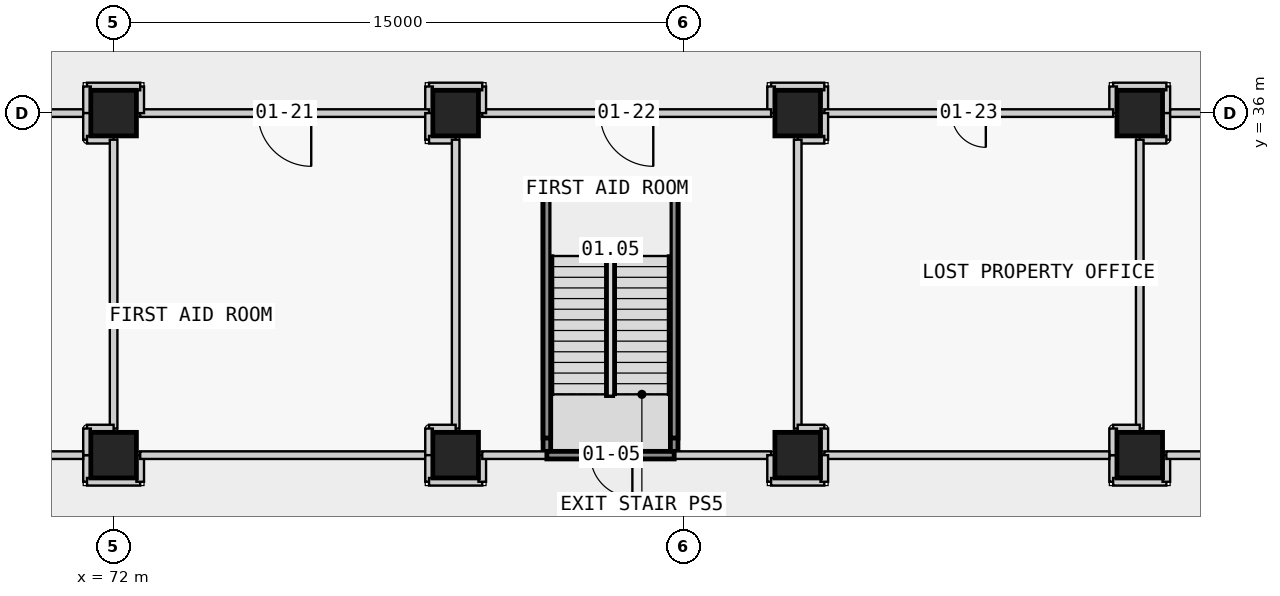
"""IFC4 building model, lengths in metres.
Left out: names, types, materials, properties, quantities, classifications, styles, units other than length and angle.
Written with IfcOpenShell. Run it as: python <this file> out.ifc"""

import sys

from ifc_helpers import new_model, si_unit, direction, frame, frame_2d, origin, origin_2d, place, context, subcontext, project, spatial, rectangle, extrude, element, fill, save


model = new_model("IFC4")
c1 = context("Model", 3, precision=1e-05, world=origin(), true_north=direction((0.0, 1.0)))
c2 = subcontext(c1, "Body", "Model", "MODEL_VIEW")
j1 = project(units=[si_unit("LENGTHUNIT", "METRE"), si_unit("PLANEANGLEUNIT", "RADIAN")], contexts=[c1])
p1 = place(None, origin())
s1 = spatial("IfcSite", under=j1, at=p1, CompositionType="ELEMENT")
p2 = place(p1, origin())
s2 = spatial("IfcBuilding", under=s1, at=p2, CompositionType="ELEMENT")
p3 = place(p2, frame((0.0, 0.0, 8.0)))
s3 = spatial("IfcBuildingStorey", under=s2, at=p3, CompositionType="ELEMENT", Elevation=8.0)
for number, where, z_axis, x_axis in (
    (1, (72.0, 27.0, 0.0), (0.0, 0.0, 1.0), (1.0, 0.0, 0.0)),
    (2, (72.0, 36.0, 0.0), (0.0, 0.0, 1.0), (1.0, 0.0, 0.0)),
    (3, (81.0, 27.0, 0.0), (0.0, 0.0, 1.0), (1.0, 0.0, 0.0)),
    (4, (81.0, 36.0, 0.0), (0.0, 0.0, 1.0), (1.0, 0.0, 0.0)),
    (5, (90.0, 27.0, 0.0), (0.0, 0.0, 1.0), (1.0, 0.0, 0.0)),
    (6, (90.0, 36.0, 0.0), (0.0, 0.0, 1.0), (1.0, 0.0, 0.0)),
    (7, (99.0, 27.0, 0.0), (0.0, 0.0, 1.0), (1.0, 0.0, 0.0)),
    (8, (99.0, 36.0, 0.0), (0.0, 0.0, 1.0), (1.0, 0.0, 0.0)),
):
    element("IfcColumn", number, at=place(p3, frame(where, z_axis=z_axis, x_axis=x_axis)), inside=s3, PredefinedType="COLUMN", context=c2, shape_type="SweptSolid", body=[
        extrude(rectangle(XDim=1.2, YDim=1.2, at=origin_2d()), origin(), (0.0, 0.0, 1.0), 4.8),
    ])
p4 = place(p3, frame((71.3, 36.0, 0.0), z_axis=(0.0, 0.0, 1.0), x_axis=(-1.0, 0.0, 0.0)))
e9 = element("IfcWall", 9, at=p4, inside=s3, PredefinedType="PARTITIONING", context=c2, shape_type="SweptSolid", body=[
    extrude(rectangle(XDim=7.6, YDim=0.2, at=frame_2d((3.8, 0.0))), origin(), (0.0, 0.0, 1.0), 3.75),
])
p5 = place(p4, frame((3.35, 0.0, 0.0)))
e10 = element("IfcOpeningElement", 10, at=p5, cuts=e9, PredefinedType="OPENING", context=c2, shape_type="SweptSolid", body=[
    extrude(rectangle(XDim=0.9, YDim=2.1, at=frame_2d((0.45, 1.05))), frame((0.0, 0.11, 0.0), z_axis=(0.0, -1.0, 0.0), x_axis=(1.0, 0.0, 0.0)), (0.0, 0.0, 1.0), 0.22),
])
p6 = place(p3, frame((83.4, 27.0, 0.0), z_axis=(0.0, 0.0, 1.0), x_axis=(0.0, 1.0, 0.0)))
e11 = element("IfcWall", 11, at=p6, inside=s3, PredefinedType="PARTITIONING", context=c2, shape_type="SweptSolid", body=[
    extrude(rectangle(XDim=6.9, YDim=0.2, at=frame_2d((3.45, 0.0))), origin(), (0.0, 0.0, 1.0), 3.75),
])
p7 = place(p3, frame((83.4, 33.9, 0.0), z_axis=(0.0, 0.0, 1.0), x_axis=(1.0, 0.0, 0.0)))
e12 = element("IfcWall", 12, at=p7, inside=s3, PredefinedType="PARTITIONING", context=c2, shape_type="SweptSolid", body=[
    extrude(rectangle(XDim=3.35, YDim=0.2, at=frame_2d((1.675, 0.0))), origin(), (0.0, 0.0, 1.0), 4.45),
])
p8 = place(p3, frame((86.75, 33.9, 0.0), z_axis=(0.0, 0.0, 1.0), x_axis=(0.0, -1.0, 0.0)))
e13 = element("IfcWall", 13, at=p8, inside=s3, PredefinedType="PARTITIONING", context=c2, shape_type="SweptSolid", body=[
    extrude(rectangle(XDim=6.9, YDim=0.2, at=frame_2d((3.45, 0.0))), origin(), (0.0, 0.0, 1.0), 3.75),
])
p9 = place(p3, frame((90.7, 36.0, 0.0), z_axis=(0.0, 0.0, 1.0), x_axis=(0.0, 1.0, 0.0)))
e14 = element("IfcWall", 14, at=p9, inside=s3, PredefinedType="PARTITIONING", context=c2, shape_type="SweptSolid", body=[
    extrude(rectangle(XDim=0.7, YDim=0.2, at=frame_2d((0.35, 0.0))), origin(), (0.0, 0.0, 1.0), 3.75),
])
p10 = place(p3, frame((90.7, 36.7, 0.0), z_axis=(0.0, 0.0, 1.0), x_axis=(-1.0, 0.0, 0.0)))
e15 = element("IfcWall", 15, at=p10, inside=s3, PredefinedType="PARTITIONING", context=c2, shape_type="SweptSolid", body=[
    extrude(rectangle(XDim=1.4, YDim=0.2, at=frame_2d((0.7, 0.0))), origin(), (0.0, 0.0, 1.0), 3.75),
])
p11 = place(p3, frame((89.3, 36.7, 0.0), z_axis=(0.0, 0.0, 1.0), x_axis=(0.0, -1.0, 0.0)))
e16 = element("IfcWall", 16, at=p11, inside=s3, PredefinedType="PARTITIONING", context=c2, shape_type="SweptSolid", body=[
    extrude(rectangle(XDim=0.7, YDim=0.2, at=frame_2d((0.35, 0.0))), origin(), (0.0, 0.0, 1.0), 3.75),
])
p12 = place(p3, frame((89.3, 36.0, 0.0), z_axis=(0.0, 0.0, 1.0), x_axis=(-1.0, 0.0, 0.0)))
e17 = element("IfcWall", 17, at=p12, inside=s3, PredefinedType="PARTITIONING", context=c2, shape_type="SweptSolid", body=[
    extrude(rectangle(XDim=7.6, YDim=0.2, at=frame_2d((3.8, 0.0))), origin(), (0.0, 0.0, 1.0), 3.75),
])
p13 = place(p12, frame((3.1, 0.0, 0.0)))
e18 = element("IfcOpeningElement", 18, at=p13, cuts=e17, PredefinedType="OPENING", context=c2, shape_type="SweptSolid", body=[
    extrude(rectangle(XDim=1.4, YDim=2.1, at=frame_2d((0.7, 1.05))), frame((0.0, 0.11, 0.0), z_axis=(0.0, -1.0, 0.0), x_axis=(1.0, 0.0, 0.0)), (0.0, 0.0, 1.0), 0.22),
])
p14 = place(p3, frame((81.7, 36.0, 0.0), z_axis=(0.0, 0.0, 1.0), x_axis=(0.0, 1.0, 0.0)))
e19 = element("IfcWall", 19, at=p14, inside=s3, PredefinedType="PARTITIONING", context=c2, shape_type="SweptSolid", body=[
    extrude(rectangle(XDim=0.7, YDim=0.2, at=frame_2d((0.35, 0.0))), origin(), (0.0, 0.0, 1.0), 3.75),
])
p15 = place(p3, frame((81.7, 36.7, 0.0), z_axis=(0.0, 0.0, 1.0), x_axis=(-1.0, 0.0, 0.0)))
e20 = element("IfcWall", 20, at=p15, inside=s3, PredefinedType="PARTITIONING", context=c2, shape_type="SweptSolid", body=[
    extrude(rectangle(XDim=1.4, YDim=0.2, at=frame_2d((0.7, 0.0))), origin(), (0.0, 0.0, 1.0), 3.75),
])
for number, where, z_axis, x_axis in (
    (21, (80.3, 36.7, 0.0), (0.0, 0.0, 1.0), (0.0, -1.0, 0.0)),
    (22, (98.3, 27.0, 0.0), (0.0, 0.0, 1.0), (0.0, -1.0, 0.0)),
):
    element("IfcWall", number, at=place(p3, frame(where, z_axis=z_axis, x_axis=x_axis)), inside=s3, PredefinedType="PARTITIONING", context=c2, shape_type="SweptSolid", body=[
        extrude(rectangle(XDim=0.7, YDim=0.2, at=frame_2d((0.35, 0.0))), origin(), (0.0, 0.0, 1.0), 3.75),
    ])
p16 = place(p3, frame((98.3, 26.3, 0.0), z_axis=(0.0, 0.0, 1.0), x_axis=(1.0, 0.0, 0.0)))
e23 = element("IfcWall", 23, at=p16, inside=s3, PredefinedType="PARTITIONING", context=c2, shape_type="SweptSolid", body=[
    extrude(rectangle(XDim=1.4, YDim=0.2, at=frame_2d((0.7, 0.0))), origin(), (0.0, 0.0, 1.0), 4.45),
])
p17 = place(p3, frame((99.7, 26.3, 0.0), z_axis=(0.0, 0.0, 1.0), x_axis=(0.0, 1.0, 0.0)))
e24 = element("IfcWall", 24, at=p17, inside=s3, PredefinedType="PARTITIONING", context=c2, shape_type="SweptSolid", body=[
    extrude(rectangle(XDim=0.7, YDim=0.2, at=frame_2d((0.35, 0.0))), origin(), (0.0, 0.0, 1.0), 3.75),
])
p18 = place(p3, frame((99.7, 27.0, 0.0), z_axis=(0.0, 0.0, 1.0), x_axis=(1.0, 0.0, 0.0)))
e25 = element("IfcWall", 25, at=p18, inside=s3, PredefinedType="PARTITIONING", context=c2, shape_type="SweptSolid", body=[
    extrude(rectangle(XDim=6.1, YDim=0.2, at=frame_2d((3.05, 0.0))), origin(), (0.0, 0.0, 1.0), 3.75),
])
p19 = place(p18, frame((2.6, 0.0, 0.0)))
e26 = element("IfcOpeningElement", 26, at=p19, cuts=e25, PredefinedType="OPENING", context=c2, shape_type="SweptSolid", body=[
    extrude(rectangle(XDim=0.9, YDim=2.1, at=frame_2d((0.45, 1.05))), frame((0.0, 0.11, 0.0), z_axis=(0.0, -1.0, 0.0), x_axis=(1.0, 0.0, 0.0)), (0.0, 0.0, 1.0), 0.22),
])
p20 = place(p3, frame((80.3, 36.0, 0.0), z_axis=(0.0, 0.0, 1.0), x_axis=(-1.0, 0.0, 0.0)))
e27 = element("IfcWall", 27, at=p20, inside=s3, PredefinedType="PARTITIONING", context=c2, shape_type="SweptSolid", body=[
    extrude(rectangle(XDim=7.6, YDim=0.2, at=frame_2d((3.8, 0.0))), origin(), (0.0, 0.0, 1.0), 3.75),
])
p21 = place(p20, frame((3.1, 0.0, 0.0)))
e28 = element("IfcOpeningElement", 28, at=p21, cuts=e27, PredefinedType="OPENING", context=c2, shape_type="SweptSolid", body=[
    extrude(rectangle(XDim=1.4, YDim=2.1, at=frame_2d((0.7, 1.05))), frame((0.0, 0.11, 0.0), z_axis=(0.0, -1.0, 0.0), x_axis=(1.0, 0.0, 0.0)), (0.0, 0.0, 1.0), 0.22),
])
p22 = place(p3, frame((72.7, 36.0, 0.0), z_axis=(0.0, 0.0, 1.0), x_axis=(0.0, 1.0, 0.0)))
e29 = element("IfcWall", 29, at=p22, inside=s3, PredefinedType="PARTITIONING", context=c2, shape_type="SweptSolid", body=[
    extrude(rectangle(XDim=0.7, YDim=0.2, at=frame_2d((0.35, 0.0))), origin(), (0.0, 0.0, 1.0), 3.75),
])
p23 = place(p3, frame((72.7, 36.7, 0.0), z_axis=(0.0, 0.0, 1.0), x_axis=(-1.0, 0.0, 0.0)))
e30 = element("IfcWall", 30, at=p23, inside=s3, PredefinedType="PARTITIONING", context=c2, shape_type="SweptSolid", body=[
    extrude(rectangle(XDim=1.4, YDim=0.2, at=frame_2d((0.7, 0.0))), origin(), (0.0, 0.0, 1.0), 3.75),
])
for number, where, z_axis, x_axis in (
    (31, (71.3, 36.7, 0.0), (0.0, 0.0, 1.0), (0.0, -1.0, 0.0)),
    (32, (99.7, 36.0, 0.0), (0.0, 0.0, 1.0), (0.0, 1.0, 0.0)),
):
    element("IfcWall", number, at=place(p3, frame(where, z_axis=z_axis, x_axis=x_axis)), inside=s3, PredefinedType="PARTITIONING", context=c2, shape_type="SweptSolid", body=[
        extrude(rectangle(XDim=0.7, YDim=0.2, at=frame_2d((0.35, 0.0))), origin(), (0.0, 0.0, 1.0), 3.75),
    ])
p24 = place(p3, frame((99.7, 36.7, 0.0), z_axis=(0.0, 0.0, 1.0), x_axis=(-1.0, 0.0, 0.0)))
e33 = element("IfcWall", 33, at=p24, inside=s3, PredefinedType="PARTITIONING", context=c2, shape_type="SweptSolid", body=[
    extrude(rectangle(XDim=1.4, YDim=0.2, at=frame_2d((0.7, 0.0))), origin(), (0.0, 0.0, 1.0), 3.75),
])
p25 = place(p3, frame((98.3, 36.7, 0.0), z_axis=(0.0, 0.0, 1.0), x_axis=(0.0, -1.0, 0.0)))
e34 = element("IfcWall", 34, at=p25, inside=s3, PredefinedType="PARTITIONING", context=c2, shape_type="SweptSolid", body=[
    extrude(rectangle(XDim=0.7, YDim=0.2, at=frame_2d((0.35, 0.0))), origin(), (0.0, 0.0, 1.0), 3.75),
])
p26 = place(p3, frame((98.3, 36.0, 0.0), z_axis=(0.0, 0.0, 1.0), x_axis=(-1.0, 0.0, 0.0)))
e35 = element("IfcWall", 35, at=p26, inside=s3, PredefinedType="PARTITIONING", context=c2, shape_type="SweptSolid", body=[
    extrude(rectangle(XDim=7.6, YDim=0.2, at=frame_2d((3.8, 0.0))), origin(), (0.0, 0.0, 1.0), 3.75),
])
p27 = place(p26, frame((3.35, 0.0, 0.0)))
e36 = element("IfcOpeningElement", 36, at=p27, cuts=e35, PredefinedType="OPENING", context=c2, shape_type="SweptSolid", body=[
    extrude(rectangle(XDim=0.9, YDim=2.1, at=frame_2d((0.45, 1.05))), frame((0.0, 0.11, 0.0), z_axis=(0.0, -1.0, 0.0), x_axis=(1.0, 0.0, 0.0)), (0.0, 0.0, 1.0), 0.22),
])
p28 = place(p3, frame((71.3, 27.0, 0.0), z_axis=(0.0, 0.0, 1.0), x_axis=(0.0, -1.0, 0.0)))
e37 = element("IfcWall", 37, at=p28, inside=s3, PredefinedType="PARTITIONING", context=c2, shape_type="SweptSolid", body=[
    extrude(rectangle(XDim=0.7, YDim=0.2, at=frame_2d((0.35, 0.0))), origin(), (0.0, 0.0, 1.0), 3.75),
])
p29 = place(p3, frame((71.3, 26.3, 0.0), z_axis=(0.0, 0.0, 1.0), x_axis=(1.0, 0.0, 0.0)))
e38 = element("IfcWall", 38, at=p29, inside=s3, PredefinedType="PARTITIONING", context=c2, shape_type="SweptSolid", body=[
    extrude(rectangle(XDim=1.4, YDim=0.2, at=frame_2d((0.7, 0.0))), origin(), (0.0, 0.0, 1.0), 4.45),
])
p30 = place(p3, frame((72.7, 26.3, 0.0), z_axis=(0.0, 0.0, 1.0), x_axis=(0.0, 1.0, 0.0)))
e39 = element("IfcWall", 39, at=p30, inside=s3, PredefinedType="PARTITIONING", context=c2, shape_type="SweptSolid", body=[
    extrude(rectangle(XDim=0.7, YDim=0.2, at=frame_2d((0.35, 0.0))), origin(), (0.0, 0.0, 1.0), 3.75),
])
p31 = place(p3, frame((72.7, 27.0, 0.0), z_axis=(0.0, 0.0, 1.0), x_axis=(1.0, 0.0, 0.0)))
e40 = element("IfcWall", 40, at=p31, inside=s3, PredefinedType="PARTITIONING", context=c2, shape_type="SweptSolid", body=[
    extrude(rectangle(XDim=7.6, YDim=0.2, at=frame_2d((3.8, 0.0))), origin(), (0.0, 0.0, 1.0), 3.75),
])
for number, where, z_axis, x_axis in (
    (41, (80.3, 36.0, 0.0), (0.0, 0.0, 1.0), (0.0, -1.0, 0.0)),
    (42, (80.3, 35.3, 0.0), (0.0, 0.0, 1.0), (1.0, 0.0, 0.0)),
):
    element("IfcWall", number, at=place(p3, frame(where, z_axis=z_axis, x_axis=x_axis)), inside=s3, PredefinedType="PARTITIONING", context=c2, shape_type="SweptSolid", body=[
        extrude(rectangle(XDim=0.7, YDim=0.2, at=frame_2d((0.35, 0.0))), origin(), (0.0, 0.0, 1.0), 3.75),
    ])
p32 = place(p3, frame((81.0, 35.3, 0.0), z_axis=(0.0, 0.0, 1.0), x_axis=(0.0, -1.0, 0.0)))
e43 = element("IfcWall", 43, at=p32, inside=s3, PredefinedType="PARTITIONING", context=c2, shape_type="SweptSolid", body=[
    extrude(rectangle(XDim=7.6, YDim=0.2, at=frame_2d((3.8, 0.0))), origin(), (0.0, 0.0, 1.0), 3.75),
])
for number, where, z_axis, x_axis in (
    (44, (81.0, 27.7, 0.0), (0.0, 0.0, 1.0), (-1.0, 0.0, 0.0)),
    (45, (80.3, 27.7, 0.0), (0.0, 0.0, 1.0), (0.0, -1.0, 0.0)),
    (46, (99.7, 36.0, 0.0), (0.0, 0.0, 1.0), (0.0, -1.0, 0.0)),
    (47, (99.7, 35.3, 0.0), (0.0, 0.0, 1.0), (-1.0, 0.0, 0.0)),
):
    element("IfcWall", number, at=place(p3, frame(where, z_axis=z_axis, x_axis=x_axis)), inside=s3, PredefinedType="PARTITIONING", context=c2, shape_type="SweptSolid", body=[
        extrude(rectangle(XDim=0.7, YDim=0.2, at=frame_2d((0.35, 0.0))), origin(), (0.0, 0.0, 1.0), 3.75),
    ])
p33 = place(p3, frame((99.0, 35.3, 0.0), z_axis=(0.0, 0.0, 1.0), x_axis=(0.0, -1.0, 0.0)))
e48 = element("IfcWall", 48, at=p33, inside=s3, PredefinedType="PARTITIONING", context=c2, shape_type="SweptSolid", body=[
    extrude(rectangle(XDim=7.6, YDim=0.2, at=frame_2d((3.8, 0.0))), origin(), (0.0, 0.0, 1.0), 3.75),
])
for number, where, z_axis, x_axis in (
    (49, (99.0, 27.7, 0.0), (0.0, 0.0, 1.0), (-1.0, 0.0, 0.0)),
    (50, (98.3, 27.7, 0.0), (0.0, 0.0, 1.0), (0.0, -1.0, 0.0)),
    (51, (71.3, 36.0, 0.0), (0.0, 0.0, 1.0), (0.0, -1.0, 0.0)),
    (52, (71.3, 35.3, 0.0), (0.0, 0.0, 1.0), (1.0, 0.0, 0.0)),
):
    element("IfcWall", number, at=place(p3, frame(where, z_axis=z_axis, x_axis=x_axis)), inside=s3, PredefinedType="PARTITIONING", context=c2, shape_type="SweptSolid", body=[
        extrude(rectangle(XDim=0.7, YDim=0.2, at=frame_2d((0.35, 0.0))), origin(), (0.0, 0.0, 1.0), 3.75),
    ])
p34 = place(p3, frame((72.0, 35.3, 0.0), z_axis=(0.0, 0.0, 1.0), x_axis=(0.0, -1.0, 0.0)))
e53 = element("IfcWall", 53, at=p34, inside=s3, PredefinedType="PARTITIONING", context=c2, shape_type="SweptSolid", body=[
    extrude(rectangle(XDim=7.6, YDim=0.2, at=frame_2d((3.8, 0.0))), origin(), (0.0, 0.0, 1.0), 3.75),
])
for number, where, z_axis, x_axis in (
    (54, (72.0, 27.7, 0.0), (0.0, 0.0, 1.0), (-1.0, 0.0, 0.0)),
    (55, (71.3, 27.7, 0.0), (0.0, 0.0, 1.0), (0.0, -1.0, 0.0)),
    (56, (90.7, 36.0, 0.0), (0.0, 0.0, 1.0), (0.0, -1.0, 0.0)),
    (57, (90.7, 35.3, 0.0), (0.0, 0.0, 1.0), (-1.0, 0.0, 0.0)),
):
    element("IfcWall", number, at=place(p3, frame(where, z_axis=z_axis, x_axis=x_axis)), inside=s3, PredefinedType="PARTITIONING", context=c2, shape_type="SweptSolid", body=[
        extrude(rectangle(XDim=0.7, YDim=0.2, at=frame_2d((0.35, 0.0))), origin(), (0.0, 0.0, 1.0), 3.75),
    ])
p35 = place(p3, frame((90.0, 35.3, 0.0), z_axis=(0.0, 0.0, 1.0), x_axis=(0.0, -1.0, 0.0)))
e58 = element("IfcWall", 58, at=p35, inside=s3, PredefinedType="PARTITIONING", context=c2, shape_type="SweptSolid", body=[
    extrude(rectangle(XDim=7.6, YDim=0.2, at=frame_2d((3.8, 0.0))), origin(), (0.0, 0.0, 1.0), 3.75),
])
for number, where, z_axis, x_axis in (
    (59, (90.0, 27.7, 0.0), (0.0, 0.0, 1.0), (1.0, 0.0, 0.0)),
    (60, (90.7, 27.7, 0.0), (0.0, 0.0, 1.0), (0.0, -1.0, 0.0)),
):
    element("IfcWall", number, at=place(p3, frame(where, z_axis=z_axis, x_axis=x_axis)), inside=s3, PredefinedType="PARTITIONING", context=c2, shape_type="SweptSolid", body=[
        extrude(rectangle(XDim=0.7, YDim=0.2, at=frame_2d((0.35, 0.0))), origin(), (0.0, 0.0, 1.0), 3.75),
    ])
p36 = place(p3, frame((105.8, 36.0, 0.0), z_axis=(0.0, 0.0, 1.0), x_axis=(-1.0, 0.0, 0.0)))
e61 = element("IfcWall", 61, at=p36, inside=s3, PredefinedType="PARTITIONING", context=c2, shape_type="SweptSolid", body=[
    extrude(rectangle(XDim=6.0, YDim=0.2, at=frame_2d((3.0, 0.0))), origin(), (0.0, 0.0, 1.0), 3.75),
])
p37 = place(p3, frame((90.7, 27.0, 0.0), z_axis=(0.0, 0.0, 1.0), x_axis=(1.0, 0.0, 0.0)))
e62 = element("IfcWall", 62, at=p37, inside=s3, PredefinedType="PARTITIONING", context=c2, shape_type="SweptSolid", body=[
    extrude(rectangle(XDim=7.5, YDim=0.2, at=frame_2d((3.75, 0.0))), origin(), (0.0, 0.0, 1.0), 3.75),
])
p38 = place(p3, frame((63.8, 27.0, 0.0), z_axis=(0.0, 0.0, 1.0), x_axis=(1.0, 0.0, 0.0)))
e63 = element("IfcWall", 63, at=p38, inside=s3, PredefinedType="PARTITIONING", context=c2, shape_type="SweptSolid", body=[
    extrude(rectangle(XDim=7.4, YDim=0.2, at=frame_2d((3.7, 0.0))), origin(), (0.0, 0.0, 1.0), 3.75),
])
p39 = place(p3, frame((86.75, 27.0, 0.0), z_axis=(0.0, 0.0, 1.0), x_axis=(1.0, 0.0, 0.0)))
e64 = element("IfcWall", 64, at=p39, inside=s3, PredefinedType="PARTITIONING", context=c2, shape_type="SweptSolid", body=[
    extrude(rectangle(XDim=2.55, YDim=0.2, at=frame_2d((1.275, 0.0))), origin(), (0.0, 0.0, 1.0), 3.75),
])
p40 = place(p3, frame((89.3, 27.0, 0.0), z_axis=(0.0, 0.0, 1.0), x_axis=(0.0, -1.0, 0.0)))
e65 = element("IfcWall", 65, at=p40, inside=s3, PredefinedType="PARTITIONING", context=c2, shape_type="SweptSolid", body=[
    extrude(rectangle(XDim=0.7, YDim=0.2, at=frame_2d((0.35, 0.0))), origin(), (0.0, 0.0, 1.0), 3.75),
])
p41 = place(p3, frame((89.3, 26.3, 0.0), z_axis=(0.0, 0.0, 1.0), x_axis=(1.0, 0.0, 0.0)))
e66 = element("IfcWall", 66, at=p41, inside=s3, PredefinedType="PARTITIONING", context=c2, shape_type="SweptSolid", body=[
    extrude(rectangle(XDim=1.4, YDim=0.2, at=frame_2d((0.7, 0.0))), origin(), (0.0, 0.0, 1.0), 4.45),
])
for number, where, z_axis, x_axis in (
    (67, (90.7, 26.3, 0.0), (0.0, 0.0, 1.0), (0.0, 1.0, 0.0)),
    (68, (80.3, 27.0, 0.0), (0.0, 0.0, 1.0), (0.0, -1.0, 0.0)),
):
    element("IfcWall", number, at=place(p3, frame(where, z_axis=z_axis, x_axis=x_axis)), inside=s3, PredefinedType="PARTITIONING", context=c2, shape_type="SweptSolid", body=[
        extrude(rectangle(XDim=0.7, YDim=0.2, at=frame_2d((0.35, 0.0))), origin(), (0.0, 0.0, 1.0), 3.75),
    ])
p42 = place(p3, frame((80.3, 26.3, 0.0), z_axis=(0.0, 0.0, 1.0), x_axis=(1.0, 0.0, 0.0)))
e69 = element("IfcWall", 69, at=p42, inside=s3, PredefinedType="PARTITIONING", context=c2, shape_type="SweptSolid", body=[
    extrude(rectangle(XDim=1.4, YDim=0.2, at=frame_2d((0.7, 0.0))), origin(), (0.0, 0.0, 1.0), 4.45),
])
p43 = place(p3, frame((81.7, 26.3, 0.0), z_axis=(0.0, 0.0, 1.0), x_axis=(0.0, 1.0, 0.0)))
e70 = element("IfcWall", 70, at=p43, inside=s3, PredefinedType="PARTITIONING", context=c2, shape_type="SweptSolid", body=[
    extrude(rectangle(XDim=0.7, YDim=0.2, at=frame_2d((0.35, 0.0))), origin(), (0.0, 0.0, 1.0), 3.75),
])
p44 = place(p3, frame((81.7, 27.0, 0.0), z_axis=(0.0, 0.0, 1.0), x_axis=(1.0, 0.0, 0.0)))
e71 = element("IfcWall", 71, at=p44, inside=s3, PredefinedType="PARTITIONING", context=c2, shape_type="SweptSolid", body=[
    extrude(rectangle(XDim=1.7, YDim=0.2, at=frame_2d((0.85, 0.0))), origin(), (0.0, 0.0, 1.0), 3.75),
])
p45 = place(p3, frame((86.75, 27.0, 0.0), z_axis=(0.0, 0.0, 1.0), x_axis=(-1.0, 0.0, 0.0)))
e72 = element("IfcWall", 72, at=p45, inside=s3, PredefinedType="PARTITIONING", context=c2, shape_type="SweptSolid", body=[
    extrude(rectangle(XDim=3.35, YDim=0.2, at=frame_2d((1.675, 0.0))), origin(), (0.0, 0.0, 1.0), 3.75),
])
p46 = place(p45, frame((1.1, 0.0, 0.0)))
e73 = element("IfcOpeningElement", 73, at=p46, cuts=e72, PredefinedType="OPENING", context=c2, shape_type="SweptSolid", body=[
    extrude(rectangle(XDim=1.1, YDim=2.1, at=frame_2d((0.55, 1.05))), frame((0.0, 0.11, 0.0), z_axis=(0.0, -1.0, 0.0), x_axis=(1.0, 0.0, 0.0)), (0.0, 0.0, 1.0), 0.22),
])
for number, where, z_axis, x_axis in (
    (74, (83.4, 27.45, 3.75), (0.0, 0.0, 1.0), (0.0, 1.0, 0.0)),
    (75, (86.75, 33.9, 3.75), (0.0, 0.0, 1.0), (0.0, -1.0, 0.0)),
):
    element("IfcWall", number, at=place(p3, frame(where, z_axis=z_axis, x_axis=x_axis)), inside=s3, PredefinedType="PARTITIONING", context=c2, shape_type="SweptSolid", body=[
        extrude(rectangle(XDim=6.45, YDim=0.2, at=frame_2d((3.225, 0.0))), origin(), (0.0, 0.0, 1.0), 0.7),
    ])
p47 = place(p46, origin())
e76 = element("IfcDoor", 76, at=p47, inside=s3, OperationType="SINGLE_SWING_LEFT", PredefinedType="DOOR", context=c2, shape_type="SweptSolid", body=[
    extrude(rectangle(XDim=1.1, YDim=2.1, at=frame_2d((0.55, 1.05))), frame((0.0, 0.025, 0.0), z_axis=(0.0, -1.0, 0.0), x_axis=(1.0, 0.0, 0.0)), (0.0, 0.0, 1.0), 0.05),
])
fill(e73, e76)
p48 = place(p21, origin())
e77 = element("IfcDoor", 77, at=p48, inside=s3, OperationType="SINGLE_SWING_LEFT", PredefinedType="DOOR", context=c2, shape_type="SweptSolid", body=[
    extrude(rectangle(XDim=1.4, YDim=2.1, at=frame_2d((0.7, 1.05))), frame((0.0, 0.025, 0.0), z_axis=(0.0, -1.0, 0.0), x_axis=(1.0, 0.0, 0.0)), (0.0, 0.0, 1.0), 0.05),
])
fill(e28, e77)
p49 = place(p13, origin())
e78 = element("IfcDoor", 78, at=p49, inside=s3, OperationType="SINGLE_SWING_LEFT", PredefinedType="DOOR", context=c2, shape_type="SweptSolid", body=[
    extrude(rectangle(XDim=1.4, YDim=2.1, at=frame_2d((0.7, 1.05))), frame((0.0, 0.025, 0.0), z_axis=(0.0, -1.0, 0.0), x_axis=(1.0, 0.0, 0.0)), (0.0, 0.0, 1.0), 0.05),
])
fill(e18, e78)
p50 = place(p27, origin())
e79 = element("IfcDoor", 79, at=p50, inside=s3, OperationType="SINGLE_SWING_LEFT", PredefinedType="DOOR", context=c2, shape_type="SweptSolid", body=[
    extrude(rectangle(XDim=0.9, YDim=2.1, at=frame_2d((0.45, 1.05))), frame((0.0, 0.025, 0.0), z_axis=(0.0, -1.0, 0.0), x_axis=(1.0, 0.0, 0.0)), (0.0, 0.0, 1.0), 0.05),
])
fill(e36, e79)
save(model, sys.argv[1])
